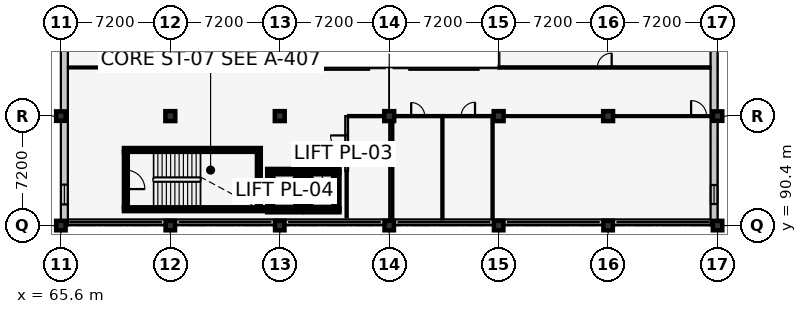
"""IFC4 building model, lengths in metres.
Left out: names, types, materials, properties, quantities, classifications, styles, units other than length and angle.
Written with IfcOpenShell. Run it as: python <this file> out.ifc"""

import sys

from ifc_helpers import new_model, si_unit, direction, frame, frame_2d, origin, origin_2d, place, context, subcontext, project, spatial, rectangle, extrude, element, fill, save


model = new_model("IFC4")
c1 = context("Model", 3, precision=1e-05, world=origin(), true_north=direction((0.0, 1.0)))
c2 = subcontext(c1, "Body", "Model", "MODEL_VIEW")
j1 = project(units=[si_unit("LENGTHUNIT", "METRE"), si_unit("PLANEANGLEUNIT", "RADIAN")], contexts=[c1])
p1 = place(None, origin())
s1 = spatial("IfcSite", under=j1, at=p1, CompositionType="ELEMENT")
p2 = place(p1, origin())
s2 = spatial("IfcBuilding", under=s1, at=p2, CompositionType="ELEMENT")
p3 = place(p2, frame((0.0, 0.0, 5.4)))
s3 = spatial("IfcBuildingStorey", under=s2, at=p3, CompositionType="ELEMENT", Elevation=5.4)
for number, where, z_axis, x_axis in (
    (1, (65.6, 90.4, 0.0), (0.0, 0.0, 1.0), (1.0, 0.0, 0.0)),
    (2, (65.6, 97.6, 0.0), (0.0, 0.0, 1.0), (1.0, 0.0, 0.0)),
    (3, (72.8, 90.4, 0.0), (0.0, 0.0, 1.0), (1.0, 0.0, 0.0)),
):
    element("IfcColumn", number, at=place(p3, frame(where, z_axis=z_axis, x_axis=x_axis)), inside=s3, PredefinedType="COLUMN", context=c2, shape_type="SweptSolid", body=[
        extrude(rectangle(XDim=0.62, YDim=0.62, at=origin_2d()), origin(), (0.0, 0.0, 1.0), 4.2),
    ])
p4 = place(p3, frame((72.8, 97.6, 0.0), z_axis=(0.0, 0.0, 1.0), x_axis=(1.0, 0.0, 0.0)))
e4 = element("IfcColumn", 4, at=p4, inside=s3, PredefinedType="COLUMN", context=c2, shape_type="SweptSolid", body=[
    extrude(rectangle(XDim=0.65, YDim=0.65, at=origin_2d()), origin(), (0.0, 0.0, 1.0), 4.2),
])
p5 = place(p3, frame((80.0, 90.4, 0.0), z_axis=(0.0, 0.0, 1.0), x_axis=(1.0, 0.0, 0.0)))
e5 = element("IfcColumn", 5, at=p5, inside=s3, PredefinedType="COLUMN", context=c2, shape_type="SweptSolid", body=[
    extrude(rectangle(XDim=0.62, YDim=0.62, at=origin_2d()), origin(), (0.0, 0.0, 1.0), 4.2),
])
p6 = place(p3, frame((80.0, 97.6, 0.0), z_axis=(0.0, 0.0, 1.0), x_axis=(1.0, 0.0, 0.0)))
e6 = element("IfcColumn", 6, at=p6, inside=s3, PredefinedType="COLUMN", context=c2, shape_type="SweptSolid", body=[
    extrude(rectangle(XDim=0.65, YDim=0.65, at=origin_2d()), origin(), (0.0, 0.0, 1.0), 4.2),
])
p7 = place(p3, frame((87.2, 90.4, 0.0), z_axis=(0.0, 0.0, 1.0), x_axis=(1.0, 0.0, 0.0)))
e7 = element("IfcColumn", 7, at=p7, inside=s3, PredefinedType="COLUMN", context=c2, shape_type="SweptSolid", body=[
    extrude(rectangle(XDim=0.62, YDim=0.62, at=origin_2d()), origin(), (0.0, 0.0, 1.0), 4.2),
])
p8 = place(p3, frame((87.2, 97.6, 0.0), z_axis=(0.0, 0.0, 1.0), x_axis=(1.0, 0.0, 0.0)))
e8 = element("IfcColumn", 8, at=p8, inside=s3, PredefinedType="COLUMN", context=c2, shape_type="SweptSolid", body=[
    extrude(rectangle(XDim=0.65, YDim=0.65, at=origin_2d()), origin(), (0.0, 0.0, 1.0), 4.2),
])
p9 = place(p3, frame((94.4, 90.4, 0.0), z_axis=(0.0, 0.0, 1.0), x_axis=(1.0, 0.0, 0.0)))
e9 = element("IfcColumn", 9, at=p9, inside=s3, PredefinedType="COLUMN", context=c2, shape_type="SweptSolid", body=[
    extrude(rectangle(XDim=0.62, YDim=0.62, at=origin_2d()), origin(), (0.0, 0.0, 1.0), 4.2),
])
p10 = place(p3, frame((94.4, 97.6, 0.0), z_axis=(0.0, 0.0, 1.0), x_axis=(1.0, 0.0, 0.0)))
e10 = element("IfcColumn", 10, at=p10, inside=s3, PredefinedType="COLUMN", context=c2, shape_type="SweptSolid", body=[
    extrude(rectangle(XDim=0.65, YDim=0.65, at=origin_2d()), origin(), (0.0, 0.0, 1.0), 4.2),
])
p11 = place(p3, frame((101.6, 90.4, 0.0), z_axis=(0.0, 0.0, 1.0), x_axis=(1.0, 0.0, 0.0)))
e11 = element("IfcColumn", 11, at=p11, inside=s3, PredefinedType="COLUMN", context=c2, shape_type="SweptSolid", body=[
    extrude(rectangle(XDim=0.62, YDim=0.62, at=origin_2d()), origin(), (0.0, 0.0, 1.0), 4.2),
])
p12 = place(p3, frame((101.6, 97.6, 0.0), z_axis=(0.0, 0.0, 1.0), x_axis=(1.0, 0.0, 0.0)))
e12 = element("IfcColumn", 12, at=p12, inside=s3, PredefinedType="COLUMN", context=c2, shape_type="SweptSolid", body=[
    extrude(rectangle(XDim=0.65, YDim=0.65, at=origin_2d()), origin(), (0.0, 0.0, 1.0), 4.2),
])
for number, where, z_axis, x_axis in (
    (13, (108.8, 90.4, 0.0), (0.0, 0.0, 1.0), (1.0, 0.0, 0.0)),
    (14, (108.8, 97.6, 0.0), (0.0, 0.0, 1.0), (1.0, 0.0, 0.0)),
):
    element("IfcColumn", number, at=place(p3, frame(where, z_axis=z_axis, x_axis=x_axis)), inside=s3, PredefinedType="COLUMN", context=c2, shape_type="SweptSolid", body=[
        extrude(rectangle(XDim=0.62, YDim=0.62, at=origin_2d()), origin(), (0.0, 0.0, 1.0), 4.2),
    ])
p13 = place(p3, frame((108.8, 90.63, 0.0), z_axis=(0.0, 0.0, 1.0), x_axis=(-1.0, 0.0, 0.0)))
e15 = element("IfcWall", 15, at=p13, inside=s3, PredefinedType="SOLIDWALL", context=c2, shape_type="SweptSolid", body=[
    extrude(rectangle(XDim=43.2, YDim=0.35, at=frame_2d((21.6, 0.0))), origin(), (0.0, 0.0, 1.0), 0.85),
])
p14 = place(p3, frame((108.57, 119.0, 0.0), z_axis=(0.0, 0.0, 1.0), x_axis=(0.0, -1.0, 0.0)))
e16 = element("IfcWall", 16, at=p14, inside=s3, PredefinedType="SOLIDWALL", context=c2, shape_type="SweptSolid", body=[
    extrude(rectangle(XDim=28.6, YDim=0.46, at=frame_2d((14.3, 0.0))), origin(), (0.0, 0.0, 1.0), 3.175),
])
p15 = place(p14, frame((1.418, 0.0, 0.9)))
e17 = element("IfcOpeningElement", 17, at=p15, cuts=e16, PredefinedType="OPENING", context=c2, shape_type="SweptSolid", body=[
    extrude(rectangle(XDim=1.25, YDim=1.45, at=frame_2d((0.625, 0.725))), frame((0.0, 0.242, 0.0), z_axis=(0.0, -1.0, 0.0), x_axis=(1.0, 0.0, 0.0)), (0.0, 0.0, 1.0), 0.484),
])
p16 = place(p14, frame((9.489, 0.0, 0.9)))
e18 = element("IfcOpeningElement", 18, at=p16, cuts=e16, PredefinedType="OPENING", context=c2, shape_type="SweptSolid", body=[
    extrude(rectangle(XDim=1.45, YDim=1.45, at=frame_2d((0.725, 0.725))), frame((0.0, 0.242, 0.0), z_axis=(0.0, -1.0, 0.0), x_axis=(1.0, 0.0, 0.0)), (0.0, 0.0, 1.0), 0.484),
])
p17 = place(p14, frame((25.932, 0.0, 0.9)))
e19 = element("IfcOpeningElement", 19, at=p17, cuts=e16, PredefinedType="OPENING", context=c2, shape_type="SweptSolid", body=[
    extrude(rectangle(XDim=1.25, YDim=1.6, at=frame_2d((0.625, 0.8))), frame((0.0, 0.242, 0.0), z_axis=(0.0, -1.0, 0.0), x_axis=(1.0, 0.0, 0.0)), (0.0, 0.0, 1.0), 0.484),
])
p18 = place(p3, frame((65.83, 90.4, 0.0), z_axis=(0.0, 0.0, 1.0), x_axis=(0.0, 1.0, 0.0)))
e20 = element("IfcWall", 20, at=p18, inside=s3, PredefinedType="SOLIDWALL", context=c2, shape_type="SweptSolid", body=[
    extrude(rectangle(XDim=28.6, YDim=0.46, at=frame_2d((14.3, 0.0))), origin(), (0.0, 0.0, 1.0), 3.175),
])
p19 = place(p18, frame((1.393, 0.0, 0.9)))
e21 = element("IfcOpeningElement", 21, at=p19, cuts=e20, PredefinedType="OPENING", context=c2, shape_type="SweptSolid", body=[
    extrude(rectangle(XDim=1.3, YDim=1.35, at=frame_2d((0.65, 0.675))), frame((0.0, 0.242, 0.0), z_axis=(0.0, -1.0, 0.0), x_axis=(1.0, 0.0, 0.0)), (0.0, 0.0, 1.0), 0.484),
])
p20 = place(p18, frame((17.811, 0.0, 0.9)))
e22 = element("IfcOpeningElement", 22, at=p20, cuts=e20, PredefinedType="OPENING", context=c2, shape_type="SweptSolid", body=[
    extrude(rectangle(XDim=1.15, YDim=1.45, at=frame_2d((0.575, 0.725))), frame((0.0, 0.242, 0.0), z_axis=(0.0, -1.0, 0.0), x_axis=(1.0, 0.0, 0.0)), (0.0, 0.0, 1.0), 0.484),
])
p21 = place(p18, frame((25.882, 0.0, 0.9)))
e23 = element("IfcOpeningElement", 23, at=p21, cuts=e20, PredefinedType="OPENING", context=c2, shape_type="SweptSolid", body=[
    extrude(rectangle(XDim=1.35, YDim=1.45, at=frame_2d((0.675, 0.725))), frame((0.0, 0.242, 0.0), z_axis=(0.0, -1.0, 0.0), x_axis=(1.0, 0.0, 0.0)), (0.0, 0.0, 1.0), 0.484),
])
p22 = place(p3, frame((69.75, 91.475, 0.0), z_axis=(0.0, 0.0, 1.0), x_axis=(1.0, 0.0, 0.0)))
e24 = element("IfcWall", 24, at=p22, inside=s3, PredefinedType="SHEAR", context=c2, shape_type="SweptSolid", body=[
    extrude(rectangle(XDim=9.57, YDim=0.25, at=frame_2d((4.785, 0.0))), origin(), (0.0, 0.0, 1.0), 3.92),
])
p23 = place(p3, frame((78.75, 95.375, 0.0), z_axis=(0.0, 0.0, 1.0), x_axis=(-1.0, 0.0, 0.0)))
e25 = element("IfcWall", 25, at=p23, inside=s3, PredefinedType="SHEAR", context=c2, shape_type="SweptSolid", body=[
    extrude(rectangle(XDim=9.0, YDim=0.25, at=frame_2d((4.5, 0.0))), origin(), (0.0, 0.0, 1.0), 3.92),
])
p24 = place(p3, frame((69.875, 95.25, 0.0), z_axis=(0.0, 0.0, 1.0), x_axis=(0.0, -1.0, 0.0)))
e26 = element("IfcWall", 26, at=p24, inside=s3, PredefinedType="SHEAR", context=c2, shape_type="SweptSolid", body=[
    extrude(rectangle(XDim=3.65, YDim=0.25, at=frame_2d((1.825, 0.0))), origin(), (0.0, 0.0, 1.0), 3.92),
])
p25 = place(p24, frame((1.2, 0.0, 0.0)))
e27 = element("IfcOpeningElement", 27, at=p25, cuts=e26, PredefinedType="OPENING", context=c2, shape_type="SweptSolid", body=[
    extrude(rectangle(XDim=1.25, YDim=2.15, at=frame_2d((0.625, 1.075))), frame((0.0, 0.137, 0.0), z_axis=(0.0, -1.0, 0.0), x_axis=(1.0, 0.0, 0.0)), (0.0, 0.0, 1.0), 0.274),
])
p26 = place(p3, frame((78.625, 91.6, 0.0), z_axis=(0.0, 0.0, 1.0), x_axis=(0.0, 1.0, 0.0)))
e28 = element("IfcWall", 28, at=p26, inside=s3, PredefinedType="SHEAR", context=c2, shape_type="SweptSolid", body=[
    extrude(rectangle(XDim=3.65, YDim=0.25, at=frame_2d((1.825, 0.0))), origin(), (0.0, 0.0, 1.0), 3.92),
])
p27 = place(p3, frame((79.175, 91.4, 0.0), z_axis=(0.0, 0.0, 1.0), x_axis=(1.0, 0.0, 0.0)))
e29 = element("IfcWall", 29, at=p27, inside=s3, PredefinedType="SHEAR", context=c2, shape_type="SweptSolid", body=[
    extrude(rectangle(XDim=2.25, YDim=0.25, at=frame_2d((1.125, 0.0))), origin(), (0.0, 0.0, 1.0), 3.92),
])
p28 = place(p3, frame((81.425, 94.0, 0.0), z_axis=(0.0, 0.0, 1.0), x_axis=(-1.0, 0.0, 0.0)))
e30 = element("IfcWall", 30, at=p28, inside=s3, PredefinedType="SHEAR", context=c2, shape_type="SweptSolid", body=[
    extrude(rectangle(XDim=2.25, YDim=0.25, at=frame_2d((1.125, 0.0))), origin(), (0.0, 0.0, 1.0), 3.92),
])
p29 = place(p28, frame((0.625, 0.0, 0.0)))
e31 = element("IfcOpeningElement", 31, at=p29, cuts=e30, PredefinedType="OPENING", context=c2, shape_type="SweptSolid", body=[
    extrude(rectangle(XDim=1.0, YDim=2.15, at=frame_2d((0.5, 1.075))), frame((0.0, 0.137, 0.0), z_axis=(0.0, -1.0, 0.0), x_axis=(1.0, 0.0, 0.0)), (0.0, 0.0, 1.0), 0.274),
])
for number, where, z_axis, x_axis in (
    (32, (79.3, 94.0, 0.0), (0.0, 0.0, 1.0), (0.0, -1.0, 0.0)),
    (33, (81.3, 91.4, 0.0), (0.0, 0.0, 1.0), (0.0, 1.0, 0.0)),
):
    element("IfcWall", number, at=place(p3, frame(where, z_axis=z_axis, x_axis=x_axis)), inside=s3, PredefinedType="SHEAR", context=c2, shape_type="SweptSolid", body=[
        extrude(rectangle(XDim=2.6, YDim=0.25, at=frame_2d((1.3, 0.0))), origin(), (0.0, 0.0, 1.0), 3.92),
    ])
p30 = place(p3, frame((81.675, 91.4, 0.0), z_axis=(0.0, 0.0, 1.0), x_axis=(1.0, 0.0, 0.0)))
e34 = element("IfcWall", 34, at=p30, inside=s3, PredefinedType="SHEAR", context=c2, shape_type="SweptSolid", body=[
    extrude(rectangle(XDim=2.25, YDim=0.25, at=frame_2d((1.125, 0.0))), origin(), (0.0, 0.0, 1.0), 3.92),
])
p31 = place(p3, frame((83.925, 94.0, 0.0), z_axis=(0.0, 0.0, 1.0), x_axis=(-1.0, 0.0, 0.0)))
e35 = element("IfcWall", 35, at=p31, inside=s3, PredefinedType="SHEAR", context=c2, shape_type="SweptSolid", body=[
    extrude(rectangle(XDim=2.25, YDim=0.25, at=frame_2d((1.125, 0.0))), origin(), (0.0, 0.0, 1.0), 3.92),
])
p32 = place(p31, frame((0.625, 0.0, 0.0)))
e36 = element("IfcOpeningElement", 36, at=p32, cuts=e35, PredefinedType="OPENING", context=c2, shape_type="SweptSolid", body=[
    extrude(rectangle(XDim=1.0, YDim=2.15, at=frame_2d((0.5, 1.075))), frame((0.0, 0.137, 0.0), z_axis=(0.0, -1.0, 0.0), x_axis=(1.0, 0.0, 0.0)), (0.0, 0.0, 1.0), 0.274),
])
for number, where, z_axis, x_axis in (
    (37, (81.8, 94.0, 0.0), (0.0, 0.0, 1.0), (0.0, -1.0, 0.0)),
    (38, (83.8, 91.4, 0.0), (0.0, 0.0, 1.0), (0.0, 1.0, 0.0)),
):
    element("IfcWall", number, at=place(p3, frame(where, z_axis=z_axis, x_axis=x_axis)), inside=s3, PredefinedType="SHEAR", context=c2, shape_type="SweptSolid", body=[
        extrude(rectangle(XDim=2.6, YDim=0.25, at=frame_2d((1.3, 0.0))), origin(), (0.0, 0.0, 1.0), 3.92),
    ])
p33 = place(p3, frame((84.4, 94.0, 0.0), z_axis=(0.0, 0.0, 1.0), x_axis=(0.0, 1.0, 0.0)))
e39 = element("IfcWall", 39, at=p33, inside=s3, PredefinedType="PARTITIONING", context=c2, shape_type="SweptSolid", body=[
    extrude(rectangle(XDim=3.6, YDim=0.18, at=frame_2d((1.8, 0.0))), origin(), (0.0, 0.0, 1.0), 3.92),
])
p34 = place(p33, frame((1.27, 0.0, 0.0)))
e40 = element("IfcOpeningElement", 40, at=p34, cuts=e39, PredefinedType="OPENING", context=c2, shape_type="SweptSolid", body=[
    extrude(rectangle(XDim=1.06, YDim=2.1, at=frame_2d((0.53, 1.05))), frame((0.0, 0.102, 0.0), z_axis=(0.0, -1.0, 0.0), x_axis=(1.0, 0.0, 0.0)), (0.0, 0.0, 1.0), 0.204),
])
p35 = place(p3, frame((84.5, 97.6, 0.0), z_axis=(0.0, 0.0, 1.0), x_axis=(1.0, 0.0, 0.0)))
e41 = element("IfcWall", 41, at=p35, inside=s3, PredefinedType="PARTITIONING", context=c2, shape_type="SweptSolid", body=[
    extrude(rectangle(XDim=2.9, YDim=0.14, at=frame_2d((1.45, 0.0))), origin(), (0.0, 0.0, 1.0), 3.145),
])
p36 = place(p3, frame((87.4, 90.815, 0.0), z_axis=(0.0, 0.0, 1.0), x_axis=(0.0, 1.0, 0.0)))
e42 = element("IfcWall", 42, at=p36, inside=s3, PredefinedType="PARTITIONING", context=c2, shape_type="SweptSolid", body=[
    extrude(rectangle(XDim=6.705, YDim=0.14, at=frame_2d((3.353, 0.0))), origin(), (0.0, 0.0, 1.0), 3.295),
])
p37 = place(p3, frame((87.48, 97.6, 0.0), z_axis=(0.0, 0.0, 1.0), x_axis=(1.0, 0.0, 0.0)))
e43 = element("IfcWall", 43, at=p37, inside=s3, PredefinedType="PARTITIONING", context=c2, shape_type="SweptSolid", body=[
    extrude(rectangle(XDim=3.22, YDim=0.14, at=frame_2d((1.61, 0.0))), origin(), (0.0, 0.0, 1.0), 3.095),
])
p38 = place(p37, frame((1.165, 0.0, 0.0)))
e44 = element("IfcOpeningElement", 44, at=p38, cuts=e43, PredefinedType="OPENING", context=c2, shape_type="SweptSolid", body=[
    extrude(rectangle(XDim=0.89, YDim=2.05, at=frame_2d((0.445, 1.025))), frame((0.0, 0.082, 0.0), z_axis=(0.0, -1.0, 0.0), x_axis=(1.0, 0.0, 0.0)), (0.0, 0.0, 1.0), 0.164),
])
p39 = place(p3, frame((90.7, 90.815, 0.0), z_axis=(0.0, 0.0, 1.0), x_axis=(0.0, 1.0, 0.0)))
e45 = element("IfcWall", 45, at=p39, inside=s3, PredefinedType="PARTITIONING", context=c2, shape_type="SweptSolid", body=[
    extrude(rectangle(XDim=6.705, YDim=0.14, at=frame_2d((3.353, 0.0))), origin(), (0.0, 0.0, 1.0), 3.685),
])
p40 = place(p3, frame((90.78, 97.6, 0.0), z_axis=(0.0, 0.0, 1.0), x_axis=(1.0, 0.0, 0.0)))
e46 = element("IfcWall", 46, at=p40, inside=s3, PredefinedType="PARTITIONING", context=c2, shape_type="SweptSolid", body=[
    extrude(rectangle(XDim=3.22, YDim=0.14, at=frame_2d((1.61, 0.0))), origin(), (0.0, 0.0, 1.0), 3.095),
])
p41 = place(p40, frame((1.155, 0.0, 0.0)))
e47 = element("IfcOpeningElement", 47, at=p41, cuts=e46, PredefinedType="OPENING", context=c2, shape_type="SweptSolid", body=[
    extrude(rectangle(XDim=0.91, YDim=2.06, at=frame_2d((0.455, 1.03))), frame((0.0, 0.082, 0.0), z_axis=(0.0, -1.0, 0.0), x_axis=(1.0, 0.0, 0.0)), (0.0, 0.0, 1.0), 0.164),
])
p42 = place(p3, frame((94.0, 90.815, 0.0), z_axis=(0.0, 0.0, 1.0), x_axis=(0.0, 1.0, 0.0)))
e48 = element("IfcWall", 48, at=p42, inside=s3, PredefinedType="PARTITIONING", context=c2, shape_type="SweptSolid", body=[
    extrude(rectangle(XDim=6.705, YDim=0.14, at=frame_2d((3.353, 0.0))), origin(), (0.0, 0.0, 1.0), 3.92),
])
p43 = place(p3, frame((94.08, 97.6, 0.0), z_axis=(0.0, 0.0, 1.0), x_axis=(1.0, 0.0, 0.0)))
e49 = element("IfcWall", 49, at=p43, inside=s3, PredefinedType="PARTITIONING", context=c2, shape_type="SweptSolid", body=[
    extrude(rectangle(XDim=14.25, YDim=0.125, at=frame_2d((7.125, 0.0))), origin(), (0.0, 0.0, 1.0), 3.045),
])
p44 = place(p43, frame((12.98, 0.0, 0.0)))
e50 = element("IfcOpeningElement", 50, at=p44, cuts=e49, PredefinedType="OPENING", context=c2, shape_type="SweptSolid", body=[
    extrude(rectangle(XDim=1.02, YDim=2.12, at=frame_2d((0.51, 1.06))), frame((0.0, 0.074, 0.0), z_axis=(0.0, -1.0, 0.0), x_axis=(1.0, 0.0, 0.0)), (0.0, 0.0, 1.0), 0.149),
])
p45 = place(p3, frame((77.0, 100.8, 0.0), z_axis=(0.0, 0.0, 1.0), x_axis=(0.0, 1.0, 0.0)))
e51 = element("IfcWall", 51, at=p45, inside=s3, PredefinedType="PARTITIONING", context=c2, shape_type="SweptSolid", body=[
    extrude(rectangle(XDim=17.73, YDim=0.18, at=frame_2d((8.865, 0.0))), origin(), (0.0, 0.0, 1.0), 3.92),
])
p46 = place(p45, frame((8.375, 0.0, 0.0)))
e52 = element("IfcOpeningElement", 52, at=p46, cuts=e51, PredefinedType="OPENING", context=c2, shape_type="SweptSolid", body=[
    extrude(rectangle(XDim=0.98, YDim=2.12, at=frame_2d((0.49, 1.06))), frame((0.0, 0.102, 0.0), z_axis=(0.0, -1.0, 0.0), x_axis=(1.0, 0.0, 0.0)), (0.0, 0.0, 1.0), 0.204),
])
p47 = place(p3, frame((66.07, 100.8, 0.0), z_axis=(0.0, 0.0, 1.0), x_axis=(1.0, 0.0, 0.0)))
e53 = element("IfcWall", 53, at=p47, inside=s3, PredefinedType="PARTITIONING", context=c2, shape_type="SweptSolid", body=[
    extrude(rectangle(XDim=10.83, YDim=0.125, at=frame_2d((5.415, 0.0))), origin(), (0.0, 0.0, 1.0), 3.92),
])
p48 = place(p3, frame((94.4, 100.8, 0.0), z_axis=(0.0, 0.0, 1.0), x_axis=(1.0, 0.0, 0.0)))
e54 = element("IfcWall", 54, at=p48, inside=s3, PredefinedType="PARTITIONING", context=c2, shape_type="SweptSolid", body=[
    extrude(rectangle(XDim=13.93, YDim=0.15, at=frame_2d((6.965, 0.0))), origin(), (0.0, 0.0, 1.0), 3.92),
])
p49 = place(p48, frame((6.495, 0.0, 0.0)))
e55 = element("IfcOpeningElement", 55, at=p49, cuts=e54, PredefinedType="OPENING", context=c2, shape_type="SweptSolid", body=[
    extrude(rectangle(XDim=0.94, YDim=2.1, at=frame_2d((0.47, 1.05))), frame((0.0, 0.087, 0.0), z_axis=(0.0, -1.0, 0.0), x_axis=(1.0, 0.0, 0.0)), (0.0, 0.0, 1.0), 0.174),
])
p50 = place(p3, frame((84.4, 90.95, 0.0), z_axis=(0.0, 0.0, 1.0), x_axis=(0.0, 1.0, 0.0)))
e56 = element("IfcWall", 56, at=p50, inside=s3, PredefinedType="PARTITIONING", context=c2, shape_type="SweptSolid", body=[
    extrude(rectangle(XDim=3.0, YDim=0.14, at=frame_2d((1.5, 0.0))), origin(), (0.0, 0.0, 1.0), 3.92),
])
p51 = place(p17, origin())
e57 = element("IfcWindow", 57, at=p51, inside=s3, PartitioningType="SINGLE_PANEL", PredefinedType="WINDOW", context=c2, shape_type="SweptSolid", body=[
    extrude(rectangle(XDim=1.25, YDim=1.6, at=frame_2d((0.625, 0.8))), frame((0.0, 0.03, 0.0), z_axis=(0.0, -1.0, 0.0), x_axis=(1.0, 0.0, 0.0)), (0.0, 0.0, 1.0), 0.06),
])
fill(e19, e57)
p52 = place(p19, origin())
e58 = element("IfcWindow", 58, at=p52, inside=s3, PartitioningType="SINGLE_PANEL", PredefinedType="WINDOW", context=c2, shape_type="SweptSolid", body=[
    extrude(rectangle(XDim=1.3, YDim=1.35, at=frame_2d((0.65, 0.675))), frame((0.0, 0.03, 0.0), z_axis=(0.0, -1.0, 0.0), x_axis=(1.0, 0.0, 0.0)), (0.0, 0.0, 1.0), 0.06),
])
fill(e21, e58)
p53 = place(p25, origin())
e59 = element("IfcDoor", 59, at=p53, inside=s3, OperationType="SINGLE_SWING_RIGHT", PredefinedType="DOOR", context=c2, shape_type="SweptSolid", body=[
    extrude(rectangle(XDim=1.25, YDim=2.15, at=frame_2d((0.625, 1.075))), frame((0.0, 0.025, 0.0), z_axis=(0.0, -1.0, 0.0), x_axis=(1.0, 0.0, 0.0)), (0.0, 0.0, 1.0), 0.05),
])
fill(e27, e59)
p54 = place(p29, origin())
e60 = element("IfcDoor", 60, at=p54, inside=s3, OperationType="SLIDING_TO_LEFT", PredefinedType="DOOR", context=c2, shape_type="SweptSolid", body=[
    extrude(rectangle(XDim=1.0, YDim=2.15, at=frame_2d((0.5, 1.075))), frame((0.0, 0.025, 0.0), z_axis=(0.0, -1.0, 0.0), x_axis=(1.0, 0.0, 0.0)), (0.0, 0.0, 1.0), 0.05),
])
fill(e31, e60)
p55 = place(p32, origin())
e61 = element("IfcDoor", 61, at=p55, inside=s3, OperationType="SLIDING_TO_LEFT", PredefinedType="DOOR", context=c2, shape_type="SweptSolid", body=[
    extrude(rectangle(XDim=1.0, YDim=2.15, at=frame_2d((0.5, 1.075))), frame((0.0, 0.025, 0.0), z_axis=(0.0, -1.0, 0.0), x_axis=(1.0, 0.0, 0.0)), (0.0, 0.0, 1.0), 0.05),
])
fill(e36, e61)
p56 = place(p34, origin())
e62 = element("IfcDoor", 62, at=p56, inside=s3, OperationType="SINGLE_SWING_RIGHT", PredefinedType="DOOR", context=c2, shape_type="SweptSolid", body=[
    extrude(rectangle(XDim=1.06, YDim=2.1, at=frame_2d((0.53, 1.05))), frame((0.0, 0.025, 0.0), z_axis=(0.0, -1.0, 0.0), x_axis=(1.0, 0.0, 0.0)), (0.0, 0.0, 1.0), 0.05),
])
fill(e40, e62)
p57 = place(p38, origin())
e63 = element("IfcDoor", 63, at=p57, inside=s3, OperationType="SINGLE_SWING_LEFT", PredefinedType="DOOR", context=c2, shape_type="SweptSolid", body=[
    extrude(rectangle(XDim=0.89, YDim=2.05, at=frame_2d((0.445, 1.025))), frame((0.0, 0.025, 0.0), z_axis=(0.0, -1.0, 0.0), x_axis=(1.0, 0.0, 0.0)), (0.0, 0.0, 1.0), 0.05),
])
fill(e44, e63)
p58 = place(p41, origin())
e64 = element("IfcDoor", 64, at=p58, inside=s3, OperationType="SINGLE_SWING_RIGHT", PredefinedType="DOOR", context=c2, shape_type="SweptSolid", body=[
    extrude(rectangle(XDim=0.91, YDim=2.06, at=frame_2d((0.455, 1.03))), frame((0.0, 0.025, 0.0), z_axis=(0.0, -1.0, 0.0), x_axis=(1.0, 0.0, 0.0)), (0.0, 0.0, 1.0), 0.05),
])
fill(e47, e64)
p59 = place(p44, origin())
e65 = element("IfcDoor", 65, at=p59, inside=s3, OperationType="SINGLE_SWING_LEFT", PredefinedType="DOOR", context=c2, shape_type="SweptSolid", body=[
    extrude(rectangle(XDim=1.02, YDim=2.12, at=frame_2d((0.51, 1.06))), frame((0.0, 0.025, 0.0), z_axis=(0.0, -1.0, 0.0), x_axis=(1.0, 0.0, 0.0)), (0.0, 0.0, 1.0), 0.05),
])
fill(e50, e65)
p60 = place(p49, origin())
e66 = element("IfcDoor", 66, at=p60, inside=s3, OperationType="SINGLE_SWING_RIGHT", PredefinedType="DOOR", context=c2, shape_type="SweptSolid", body=[
    extrude(rectangle(XDim=0.94, YDim=2.1, at=frame_2d((0.47, 1.05))), frame((0.0, 0.025, 0.0), z_axis=(0.0, -1.0, 0.0), x_axis=(1.0, 0.0, 0.0)), (0.0, 0.0, 1.0), 0.05),
])
fill(e55, e66)
save(model, sys.argv[1])
